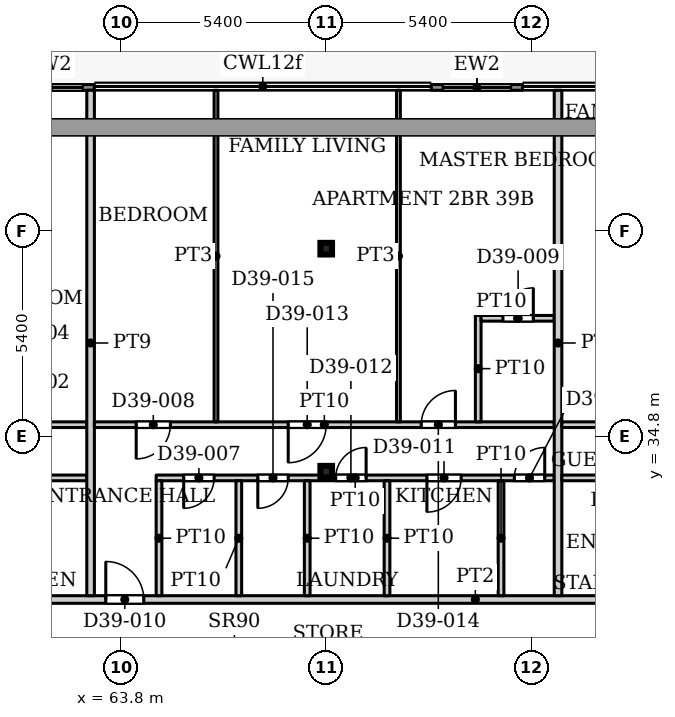
"""IFC4 building model, lengths in metres.
Left out: names, types, materials, properties, quantities, classifications, styles, units other than length and angle.
Written with IfcOpenShell. Run it as: python <this file> out.ifc"""

import sys

from ifc_helpers import new_model, si_unit, direction, frame, frame_2d, origin, origin_2d, place, context, subcontext, project, spatial, rectangle, hollow_rectangle, extrude, source, transform, mapped, element, fill, save


model = new_model("IFC4")
c1 = context("Model", 3, precision=1e-05, world=origin(), true_north=direction((0.0, 1.0)))
c2 = subcontext(c1, "Body", "Model", "MODEL_VIEW")
j1 = project(units=[si_unit("LENGTHUNIT", "METRE"), si_unit("PLANEANGLEUNIT", "RADIAN")], contexts=[c1])
p1 = place(None, origin())
s1 = spatial("IfcSite", under=j1, at=p1, CompositionType="ELEMENT")
p2 = place(p1, origin())
s2 = spatial("IfcBuilding", under=s1, at=p2, CompositionType="ELEMENT")
p3 = place(p2, frame((0.0, 0.0, 168.2)))
s3 = spatial("IfcBuildingStorey", under=s2, at=p3, CompositionType="ELEMENT", Elevation=168.2)
for number, where, z_axis, x_axis in (
    (1, (69.2, 33.863, 0.0), (0.0, 0.0, 1.0), (1.0, 0.0, 0.0)),
    (2, (69.2, 39.732, 0.0), (0.0, 0.0, 1.0), (1.0, 0.0, 0.0)),
):
    element("IfcColumn", number, at=place(p3, frame(where, z_axis=z_axis, x_axis=x_axis)), inside=s3, PredefinedType="COLUMN", context=c2, shape_type="SweptSolid", body=[
        extrude(hollow_rectangle(XDim=0.305, YDim=0.305, WallThickness=0.016, InnerFilletRadius=0.016, OuterFilletRadius=0.032, at=origin_2d()), origin(), (0.0, 0.0, 1.0), 3.9),
    ])
p4 = place(p3, frame((60.697, 43.975, 0.0), z_axis=(0.0, 0.0, 1.0), x_axis=(1.0, 0.0, 0.0)))
e3 = element("IfcWall", 3, at=p4, inside=s3, PredefinedType="SOLIDWALL", context=c2, shape_type="SweptSolid", body=[
    extrude(rectangle(XDim=2.4, YDim=0.15, at=frame_2d((1.2, 0.0))), origin(), (0.0, 0.0, 1.0), 3.75),
])
p5 = place(p4, frame((0.3, 0.0, 0.0)))
e4 = element("IfcOpeningElement", 4, at=p5, cuts=e3, PredefinedType="OPENING", context=c2, shape_type="SweptSolid", body=[
    extrude(rectangle(XDim=1.8, YDim=2.4, at=frame_2d((0.9, 1.2))), frame((0.0, 0.085, 0.0), z_axis=(0.0, -1.0, 0.0), x_axis=(1.0, 0.0, 0.0)), (0.0, 0.0, 1.0), 0.17),
])
p6 = place(p3, frame((71.965, 43.975, 0.0), z_axis=(0.0, 0.0, 1.0), x_axis=(1.0, 0.0, 0.0)))
e5 = element("IfcWall", 5, at=p6, inside=s3, PredefinedType="SOLIDWALL", context=c2, shape_type="SweptSolid", body=[
    extrude(rectangle(XDim=2.4, YDim=0.15, at=frame_2d((1.2, 0.0))), origin(), (0.0, 0.0, 1.0), 3.75),
])
p7 = place(p6, frame((0.3, 0.0, 0.0)))
e6 = element("IfcOpeningElement", 6, at=p7, cuts=e5, PredefinedType="OPENING", context=c2, shape_type="SweptSolid", body=[
    extrude(rectangle(XDim=1.8, YDim=2.4, at=frame_2d((0.9, 1.2))), frame((0.0, 0.085, 0.0), z_axis=(0.0, -1.0, 0.0), x_axis=(1.0, 0.0, 0.0)), (0.0, 0.0, 1.0), 0.17),
])
p8 = place(p3, frame((53.549, 30.5, 0.0), z_axis=(0.0, 0.0, 1.0), x_axis=(1.0, 0.0, 0.0)))
e7 = element("IfcWall", 7, at=p8, inside=s3, PredefinedType="PARTITIONING", context=c2, shape_type="SweptSolid", body=[
    extrude(rectangle(XDim=39.151, YDim=0.2, at=frame_2d((19.575, 0.0))), origin(), (0.0, 0.0, 1.0), 3.6),
])
p9 = place(p8, frame((2.801, 0.0, 0.0)))
e8 = element("IfcOpeningElement", 8, at=p9, cuts=e7, PredefinedType="OPENING", context=c2, shape_type="SweptSolid", body=[
    extrude(rectangle(XDim=1.0, YDim=2.1, at=frame_2d((0.5, 1.05))), frame((0.0, 0.11, 0.0), z_axis=(0.0, -1.0, 0.0), x_axis=(1.0, 0.0, 0.0)), (0.0, 0.0, 1.0), 0.22),
])
p10 = place(p8, frame((9.851, 0.0, 0.0)))
e9 = element("IfcOpeningElement", 9, at=p10, cuts=e7, PredefinedType="OPENING", context=c2, shape_type="SweptSolid", body=[
    extrude(rectangle(XDim=1.0, YDim=2.1, at=frame_2d((0.5, 1.05))), frame((0.0, 0.11, 0.0), z_axis=(0.0, -1.0, 0.0), x_axis=(1.0, 0.0, 0.0)), (0.0, 0.0, 1.0), 0.22),
])
p11 = place(p8, frame((28.751, 0.0, 0.0)))
e10 = element("IfcOpeningElement", 10, at=p11, cuts=e7, PredefinedType="OPENING", context=c2, shape_type="SweptSolid", body=[
    extrude(rectangle(XDim=1.0, YDim=2.1, at=frame_2d((0.5, 1.05))), frame((0.0, 0.11, 0.0), z_axis=(0.0, -1.0, 0.0), x_axis=(1.0, 0.0, 0.0)), (0.0, 0.0, 1.0), 0.22),
])
p12 = place(p8, frame((32.651, 0.0, 0.0)))
e11 = element("IfcOpeningElement", 11, at=p12, cuts=e7, PredefinedType="OPENING", context=c2, shape_type="SweptSolid", body=[
    extrude(rectangle(XDim=1.0, YDim=2.1, at=frame_2d((0.5, 1.05))), frame((0.0, 0.11, 0.0), z_axis=(0.0, -1.0, 0.0), x_axis=(1.0, 0.0, 0.0)), (0.0, 0.0, 1.0), 0.22),
])
p13 = place(p3, frame((53.549, 35.1, 0.0), z_axis=(0.0, 0.0, 1.0), x_axis=(1.0, 0.0, 0.0)))
e12 = element("IfcWall", 12, at=p13, inside=s3, PredefinedType="PARTITIONING", context=c2, shape_type="SweptSolid", body=[
    extrude(rectangle(XDim=9.351, YDim=0.15, at=frame_2d((4.675, 0.0))), origin(), (0.0, 0.0, 1.0), 3.6),
])
p14 = place(p13, frame((7.351, 0.0, 0.0)))
e13 = element("IfcOpeningElement", 13, at=p14, cuts=e12, PredefinedType="OPENING", context=c2, shape_type="SweptSolid", body=[
    extrude(rectangle(XDim=0.9, YDim=2.1, at=frame_2d((0.45, 1.05))), frame((0.0, 0.085, 0.0), z_axis=(0.0, -1.0, 0.0), x_axis=(1.0, 0.0, 0.0)), (0.0, 0.0, 1.0), 0.17),
])
p15 = place(p13, frame((2.501, 0.0, 0.0)))
e14 = element("IfcOpeningElement", 14, at=p15, cuts=e12, PredefinedType="OPENING", context=c2, shape_type="SweptSolid", body=[
    extrude(rectangle(XDim=1.0, YDim=2.1, at=frame_2d((0.5, 1.05))), frame((0.0, 0.085, 0.0), z_axis=(0.0, -1.0, 0.0), x_axis=(1.0, 0.0, 0.0)), (0.0, 0.0, 1.0), 0.17),
])
p16 = place(p3, frame((57.825, 33.7, 0.0), z_axis=(0.0, 0.0, 1.0), x_axis=(1.0, 0.0, 0.0)))
e15 = element("IfcWall", 15, at=p16, inside=s3, PredefinedType="PARTITIONING", context=c2, shape_type="SweptSolid", body=[
    extrude(rectangle(XDim=5.075, YDim=0.15, at=frame_2d((2.538, 0.0))), origin(), (0.0, 0.0, 1.0), 3.6),
])
p17 = place(p16, frame((3.075, 0.0, 0.0)))
e16 = element("IfcOpeningElement", 16, at=p17, cuts=e15, PredefinedType="OPENING", context=c2, shape_type="SweptSolid", body=[
    extrude(rectangle(XDim=0.9, YDim=2.1, at=frame_2d((0.45, 1.05))), frame((0.0, 0.085, 0.0), z_axis=(0.0, -1.0, 0.0), x_axis=(1.0, 0.0, 0.0)), (0.0, 0.0, 1.0), 0.17),
])
p18 = place(p16, frame((0.575, 0.0, 0.0)))
e17 = element("IfcOpeningElement", 17, at=p18, cuts=e15, PredefinedType="OPENING", context=c2, shape_type="SweptSolid", body=[
    extrude(rectangle(XDim=0.8, YDim=2.1, at=frame_2d((0.4, 1.05))), frame((0.0, 0.085, 0.0), z_axis=(0.0, -1.0, 0.0), x_axis=(1.0, 0.0, 0.0)), (0.0, 0.0, 1.0), 0.17),
])
p19 = place(p3, frame((63.0, 30.6, 0.0), z_axis=(0.0, 0.0, 1.0), x_axis=(0.0, 1.0, 0.0)))
e18 = element("IfcWall", 18, at=p19, inside=s3, PredefinedType="PARTITIONING", context=c2, shape_type="SweptSolid", body=[
    extrude(rectangle(XDim=13.3, YDim=0.2, at=frame_2d((6.65, 0.0))), origin(), (0.0, 0.0, 1.0), 3.6),
])
p20 = place(p3, frame((63.1, 35.1, 0.0), z_axis=(0.0, 0.0, 1.0), x_axis=(1.0, 0.0, 0.0)))
e19 = element("IfcWall", 19, at=p20, inside=s3, PredefinedType="PARTITIONING", context=c2, shape_type="SweptSolid", body=[
    extrude(rectangle(XDim=12.1, YDim=0.15, at=frame_2d((6.05, 0.0))), origin(), (0.0, 0.0, 1.0), 3.6),
])
p21 = place(p20, frame((1.1, 0.0, 0.0)))
e20 = element("IfcOpeningElement", 20, at=p21, cuts=e19, PredefinedType="OPENING", context=c2, shape_type="SweptSolid", body=[
    extrude(rectangle(XDim=0.9, YDim=2.1, at=frame_2d((0.45, 1.05))), frame((0.0, 0.085, 0.0), z_axis=(0.0, -1.0, 0.0), x_axis=(1.0, 0.0, 0.0)), (0.0, 0.0, 1.0), 0.17),
])
p22 = place(p20, frame((5.1, 0.0, 0.0)))
e21 = element("IfcOpeningElement", 21, at=p22, cuts=e19, PredefinedType="OPENING", context=c2, shape_type="SweptSolid", body=[
    extrude(rectangle(XDim=1.0, YDim=2.1, at=frame_2d((0.5, 1.05))), frame((0.0, 0.085, 0.0), z_axis=(0.0, -1.0, 0.0), x_axis=(1.0, 0.0, 0.0)), (0.0, 0.0, 1.0), 0.17),
])
p23 = place(p20, frame((8.6, 0.0, 0.0)))
e22 = element("IfcOpeningElement", 22, at=p23, cuts=e19, PredefinedType="OPENING", context=c2, shape_type="SweptSolid", body=[
    extrude(rectangle(XDim=0.9, YDim=2.1, at=frame_2d((0.45, 1.05))), frame((0.0, 0.085, 0.0), z_axis=(0.0, -1.0, 0.0), x_axis=(1.0, 0.0, 0.0)), (0.0, 0.0, 1.0), 0.17),
])
p24 = place(p3, frame((64.725, 33.7, 0.0), z_axis=(0.0, 0.0, 1.0), x_axis=(1.0, 0.0, 0.0)))
e23 = element("IfcWall", 23, at=p24, inside=s3, PredefinedType="PARTITIONING", context=c2, shape_type="SweptSolid", body=[
    extrude(rectangle(XDim=10.475, YDim=0.15, at=frame_2d((5.237, 0.0))), origin(), (0.0, 0.0, 1.0), 3.6),
])
p25 = place(p24, frame((0.725, 0.0, 0.0)))
e24 = element("IfcOpeningElement", 24, at=p25, cuts=e23, PredefinedType="OPENING", context=c2, shape_type="SweptSolid", body=[
    extrude(rectangle(XDim=0.8, YDim=2.1, at=frame_2d((0.4, 1.05))), frame((0.0, 0.085, 0.0), z_axis=(0.0, -1.0, 0.0), x_axis=(1.0, 0.0, 0.0)), (0.0, 0.0, 1.0), 0.17),
])
p26 = place(p24, frame((7.125, 0.0, 0.0)))
e25 = element("IfcOpeningElement", 25, at=p26, cuts=e23, PredefinedType="OPENING", context=c2, shape_type="SweptSolid", body=[
    extrude(rectangle(XDim=0.9, YDim=2.1, at=frame_2d((0.45, 1.05))), frame((0.0, 0.085, 0.0), z_axis=(0.0, -1.0, 0.0), x_axis=(1.0, 0.0, 0.0)), (0.0, 0.0, 1.0), 0.17),
])
p27 = place(p24, frame((4.725, 0.0, 0.0)))
e26 = element("IfcOpeningElement", 26, at=p27, cuts=e23, PredefinedType="OPENING", context=c2, shape_type="SweptSolid", body=[
    extrude(rectangle(XDim=0.8, YDim=2.1, at=frame_2d((0.4, 1.05))), frame((0.0, 0.085, 0.0), z_axis=(0.0, -1.0, 0.0), x_axis=(1.0, 0.0, 0.0)), (0.0, 0.0, 1.0), 0.17),
])
p28 = place(p24, frame((2.675, 0.0, 0.0)))
e27 = element("IfcOpeningElement", 27, at=p28, cuts=e23, PredefinedType="OPENING", context=c2, shape_type="SweptSolid", body=[
    extrude(rectangle(XDim=0.8, YDim=2.1, at=frame_2d((0.4, 1.05))), frame((0.0, 0.085, 0.0), z_axis=(0.0, -1.0, 0.0), x_axis=(1.0, 0.0, 0.0)), (0.0, 0.0, 1.0), 0.17),
])
p29 = place(p24, frame((9.425, 0.0, 0.0)))
e28 = element("IfcOpeningElement", 28, at=p29, cuts=e23, PredefinedType="OPENING", context=c2, shape_type="SweptSolid", body=[
    extrude(rectangle(XDim=0.8, YDim=2.1, at=frame_2d((0.4, 1.05))), frame((0.0, 0.085, 0.0), z_axis=(0.0, -1.0, 0.0), x_axis=(1.0, 0.0, 0.0)), (0.0, 0.0, 1.0), 0.17),
])
p30 = place(p3, frame((64.8, 30.6, 0.0), z_axis=(0.0, 0.0, 1.0), x_axis=(0.0, 1.0, 0.0)))
e29 = element("IfcWall", 29, at=p30, inside=s3, PredefinedType="PARTITIONING", context=c2, shape_type="SweptSolid", body=[
    extrude(rectangle(XDim=3.025, YDim=0.15, at=frame_2d((1.512, 0.0))), origin(), (0.0, 0.0, 1.0), 3.6),
])
p31 = place(p3, frame((66.3, 35.175, 0.0), z_axis=(0.0, 0.0, 1.0), x_axis=(0.0, 1.0, 0.0)))
e30 = element("IfcWall", 30, at=p31, inside=s3, PredefinedType="PARTITIONING", context=c2, shape_type="SweptSolid", body=[
    extrude(rectangle(XDim=8.725, YDim=0.1, at=frame_2d((4.362, 0.0))), origin(), (0.0, 0.0, 1.0), 3.6),
])
for number, where, z_axis, x_axis in (
    (31, (66.9, 30.6, 0.0), (0.0, 0.0, 1.0), (0.0, 1.0, 0.0)),
    (32, (68.7, 30.6, 0.0), (0.0, 0.0, 1.0), (0.0, 1.0, 0.0)),
    (33, (70.8, 30.6, 0.0), (0.0, 0.0, 1.0), (0.0, 1.0, 0.0)),
):
    element("IfcWall", number, at=place(p3, frame(where, z_axis=z_axis, x_axis=x_axis)), inside=s3, PredefinedType="PARTITIONING", context=c2, shape_type="SweptSolid", body=[
        extrude(rectangle(XDim=3.025, YDim=0.15, at=frame_2d((1.512, 0.0))), origin(), (0.0, 0.0, 1.0), 3.6),
    ])
p32 = place(p3, frame((71.1, 35.175, 0.0), z_axis=(0.0, 0.0, 1.0), x_axis=(0.0, 1.0, 0.0)))
e34 = element("IfcWall", 34, at=p32, inside=s3, PredefinedType="PARTITIONING", context=c2, shape_type="SweptSolid", body=[
    extrude(rectangle(XDim=8.725, YDim=0.1, at=frame_2d((4.362, 0.0))), origin(), (0.0, 0.0, 1.0), 3.6),
])
p33 = place(p3, frame((73.2, 35.175, 0.0), z_axis=(0.0, 0.0, 1.0), x_axis=(0.0, 1.0, 0.0)))
e35 = element("IfcWall", 35, at=p33, inside=s3, PredefinedType="PARTITIONING", context=c2, shape_type="SweptSolid", body=[
    extrude(rectangle(XDim=2.8, YDim=0.15, at=frame_2d((1.4, 0.0))), origin(), (0.0, 0.0, 1.0), 3.6),
])
p34 = place(p3, frame((73.275, 37.9, 0.0), z_axis=(0.0, 0.0, 1.0), x_axis=(1.0, 0.0, 0.0)))
e36 = element("IfcWall", 36, at=p34, inside=s3, PredefinedType="PARTITIONING", context=c2, shape_type="SweptSolid", body=[
    extrude(rectangle(XDim=1.925, YDim=0.15, at=frame_2d((0.962, 0.0))), origin(), (0.0, 0.0, 1.0), 3.6),
])
p35 = place(p34, frame((0.575, 0.0, 0.0)))
e37 = element("IfcOpeningElement", 37, at=p35, cuts=e36, PredefinedType="OPENING", context=c2, shape_type="SweptSolid", body=[
    extrude(rectangle(XDim=0.8, YDim=2.1, at=frame_2d((0.4, 1.05))), frame((0.0, 0.085, 0.0), z_axis=(0.0, -1.0, 0.0), x_axis=(1.0, 0.0, 0.0)), (0.0, 0.0, 1.0), 0.17),
])
p36 = place(p3, frame((73.8, 30.6, 0.0), z_axis=(0.0, 0.0, 1.0), x_axis=(0.0, 1.0, 0.0)))
e38 = element("IfcWall", 38, at=p36, inside=s3, PredefinedType="PARTITIONING", context=c2, shape_type="SweptSolid", body=[
    extrude(rectangle(XDim=3.025, YDim=0.15, at=frame_2d((1.512, 0.0))), origin(), (0.0, 0.0, 1.0), 3.6),
])
p37 = place(p3, frame((75.3, 30.6, 0.0), z_axis=(0.0, 0.0, 1.0), x_axis=(0.0, 1.0, 0.0)))
e39 = element("IfcWall", 39, at=p37, inside=s3, PredefinedType="PARTITIONING", context=c2, shape_type="SweptSolid", body=[
    extrude(rectangle(XDim=13.3, YDim=0.2, at=frame_2d((6.65, 0.0))), origin(), (0.0, 0.0, 1.0), 3.6),
])
p38 = place(p3, frame((75.4, 33.7, 0.0), z_axis=(0.0, 0.0, 1.0), x_axis=(1.0, 0.0, 0.0)))
e40 = element("IfcWall", 40, at=p38, inside=s3, PredefinedType="PARTITIONING", context=c2, shape_type="SweptSolid", body=[
    extrude(rectangle(XDim=6.275, YDim=0.15, at=frame_2d((3.138, 0.0))), origin(), (0.0, 0.0, 1.0), 3.6),
])
p39 = place(p38, frame((4.6, 0.0, 0.0)))
e41 = element("IfcOpeningElement", 41, at=p39, cuts=e40, PredefinedType="OPENING", context=c2, shape_type="SweptSolid", body=[
    extrude(rectangle(XDim=0.8, YDim=2.1, at=frame_2d((0.4, 1.05))), frame((0.0, 0.085, 0.0), z_axis=(0.0, -1.0, 0.0), x_axis=(1.0, 0.0, 0.0)), (0.0, 0.0, 1.0), 0.17),
])
p40 = place(p38, frame((1.4, 0.0, 0.0)))
e42 = element("IfcOpeningElement", 42, at=p40, cuts=e40, PredefinedType="OPENING", context=c2, shape_type="SweptSolid", body=[
    extrude(rectangle(XDim=0.9, YDim=2.1, at=frame_2d((0.45, 1.05))), frame((0.0, 0.085, 0.0), z_axis=(0.0, -1.0, 0.0), x_axis=(1.0, 0.0, 0.0)), (0.0, 0.0, 1.0), 0.17),
])
p41 = place(p3, frame((75.4, 35.1, 0.0), z_axis=(0.0, 0.0, 1.0), x_axis=(1.0, 0.0, 0.0)))
e43 = element("IfcWall", 43, at=p41, inside=s3, PredefinedType="PARTITIONING", context=c2, shape_type="SweptSolid", body=[
    extrude(rectangle(XDim=10.3, YDim=0.15, at=frame_2d((5.15, 0.0))), origin(), (0.0, 0.0, 1.0), 3.6),
])
p42 = place(p41, frame((5.3, 0.0, 0.0)))
e44 = element("IfcOpeningElement", 44, at=p42, cuts=e43, PredefinedType="OPENING", context=c2, shape_type="SweptSolid", body=[
    extrude(rectangle(XDim=0.9, YDim=2.1, at=frame_2d((0.45, 1.05))), frame((0.0, 0.085, 0.0), z_axis=(0.0, -1.0, 0.0), x_axis=(1.0, 0.0, 0.0)), (0.0, 0.0, 1.0), 0.17),
])
p43 = place(p41, frame((1.65, 0.0, 0.0)))
e45 = element("IfcOpeningElement", 45, at=p43, cuts=e43, PredefinedType="OPENING", context=c2, shape_type="SweptSolid", body=[
    extrude(rectangle(XDim=1.0, YDim=2.1, at=frame_2d((0.5, 1.05))), frame((0.0, 0.085, 0.0), z_axis=(0.0, -1.0, 0.0), x_axis=(1.0, 0.0, 0.0)), (0.0, 0.0, 1.0), 0.17),
])
p44 = place(p41, frame((8.3, 0.0, 0.0)))
e46 = element("IfcOpeningElement", 46, at=p44, cuts=e43, PredefinedType="OPENING", context=c2, shape_type="SweptSolid", body=[
    extrude(rectangle(XDim=0.9, YDim=2.1, at=frame_2d((0.45, 1.05))), frame((0.0, 0.085, 0.0), z_axis=(0.0, -1.0, 0.0), x_axis=(1.0, 0.0, 0.0)), (0.0, 0.0, 1.0), 0.17),
])
m1 = source(origin(), c2, "Body", "SweptSolid", [
    extrude(rectangle(XDim=1.8, YDim=2.4, at=frame_2d((0.9, 1.2))), frame((0.0, 0.025, 0.0), z_axis=(0.0, -1.0, 0.0), x_axis=(1.0, 0.0, 0.0)), (0.0, 0.0, 1.0), 0.05),
])
p45 = place(p5, origin())
e47 = element("IfcDoor", 47, at=p45, inside=s3, OperationType="SLIDING_TO_LEFT", PredefinedType="DOOR", context=c2, shape_type="MappedRepresentation", body=[
    mapped(m1, transform((0.0, 0.0, 0.0), x_axis=(1.0, 0.0, 0.0), y_axis=(0.0, 1.0, 0.0), z_axis=(0.0, 0.0, 1.0), scale=1.0)),
])
fill(e4, e47)
p46 = place(p7, origin())
e48 = element("IfcDoor", 48, at=p46, inside=s3, OperationType="SLIDING_TO_LEFT", PredefinedType="DOOR", context=c2, shape_type="MappedRepresentation", body=[
    mapped(m1, transform((0.0, 0.0, 0.0), x_axis=(1.0, 0.0, 0.0), y_axis=(0.0, 1.0, 0.0), z_axis=(0.0, 0.0, 1.0), scale=1.0)),
])
fill(e6, e48)
m2 = source(origin(), c2, "Body", "SweptSolid", [
    extrude(rectangle(XDim=0.8, YDim=2.1, at=frame_2d((0.4, 1.05))), frame((0.0, 0.025, 0.0), z_axis=(0.0, -1.0, 0.0), x_axis=(1.0, 0.0, 0.0)), (0.0, 0.0, 1.0), 0.05),
])
p47 = place(p25, origin())
e49 = element("IfcDoor", 49, at=p47, inside=s3, OperationType="SINGLE_SWING_RIGHT", PredefinedType="DOOR", context=c2, shape_type="MappedRepresentation", body=[
    mapped(m2, transform((0.0, 0.0, 0.0), x_axis=(1.0, 0.0, 0.0), y_axis=(0.0, 1.0, 0.0), z_axis=(0.0, 0.0, 1.0), scale=1.0)),
])
fill(e24, e49)
m3 = source(origin(), c2, "Body", "SweptSolid", [
    extrude(rectangle(XDim=0.9, YDim=2.1, at=frame_2d((0.45, 1.05))), frame((0.0, 0.025, 0.0), z_axis=(0.0, -1.0, 0.0), x_axis=(1.0, 0.0, 0.0)), (0.0, 0.0, 1.0), 0.05),
])
p48 = place(p21, origin())
e50 = element("IfcDoor", 50, at=p48, inside=s3, OperationType="SINGLE_SWING_RIGHT", PredefinedType="DOOR", context=c2, shape_type="MappedRepresentation", body=[
    mapped(m3, transform((0.0, 0.0, 0.0), x_axis=(1.0, 0.0, 0.0), y_axis=(0.0, 1.0, 0.0), z_axis=(0.0, 0.0, 1.0), scale=1.0)),
])
fill(e20, e50)
p49 = place(p35, origin())
e51 = element("IfcDoor", 51, at=p49, inside=s3, OperationType="SINGLE_SWING_LEFT", PredefinedType="DOOR", context=c2, shape_type="MappedRepresentation", body=[
    mapped(m2, transform((0.0, 0.0, 0.0), x_axis=(1.0, 0.0, 0.0), y_axis=(0.0, 1.0, 0.0), z_axis=(0.0, 0.0, 1.0), scale=1.0)),
])
fill(e37, e51)
m4 = source(origin(), c2, "Body", "SweptSolid", [
    extrude(rectangle(XDim=1.0, YDim=2.1, at=frame_2d((0.5, 1.05))), frame((0.0, 0.025, 0.0), z_axis=(0.0, -1.0, 0.0), x_axis=(1.0, 0.0, 0.0)), (0.0, 0.0, 1.0), 0.05),
])
p50 = place(p10, origin())
e52 = element("IfcDoor", 52, at=p50, inside=s3, OperationType="SINGLE_SWING_LEFT", PredefinedType="DOOR", context=c2, shape_type="MappedRepresentation", body=[
    mapped(m4, transform((0.0, 0.0, 0.0), x_axis=(1.0, 0.0, 0.0), y_axis=(0.0, 1.0, 0.0), z_axis=(0.0, 0.0, 1.0), scale=1.0)),
])
fill(e9, e52)
p51 = place(p26, origin())
e53 = element("IfcDoor", 53, at=p51, inside=s3, OperationType="SINGLE_SWING_RIGHT", PredefinedType="DOOR", context=c2, shape_type="MappedRepresentation", body=[
    mapped(m3, transform((0.0, 0.0, 0.0), x_axis=(1.0, 0.0, 0.0), y_axis=(0.0, 1.0, 0.0), z_axis=(0.0, 0.0, 1.0), scale=1.0)),
])
fill(e25, e53)
p52 = place(p27, origin())
e54 = element("IfcDoor", 54, at=p52, inside=s3, OperationType="SINGLE_SWING_LEFT", PredefinedType="DOOR", context=c2, shape_type="MappedRepresentation", body=[
    mapped(m2, transform((0.0, 0.0, 0.0), x_axis=(1.0, 0.0, 0.0), y_axis=(0.0, 1.0, 0.0), z_axis=(0.0, 0.0, 1.0), scale=1.0)),
])
fill(e26, e54)
m5 = source(origin(), c2, "Body", "SweptSolid", [
    extrude(rectangle(XDim=1.0, YDim=2.1, at=frame_2d((0.5, 1.05))), frame((0.0, 0.025, 0.0), z_axis=(0.0, -1.0, 0.0), x_axis=(1.0, 0.0, 0.0)), (0.0, 0.0, 1.0), 0.05),
])
p53 = place(p22, origin())
e55 = element("IfcDoor", 55, at=p53, inside=s3, OperationType="SINGLE_SWING_RIGHT", PredefinedType="DOOR", context=c2, shape_type="MappedRepresentation", body=[
    mapped(m5, transform((0.0, 0.0, 0.0), x_axis=(1.0, 0.0, 0.0), y_axis=(0.0, 1.0, 0.0), z_axis=(0.0, 0.0, 1.0), scale=1.0)),
])
fill(e21, e55)
p54 = place(p23, origin())
e56 = element("IfcDoor", 56, at=p54, inside=s3, OperationType="SINGLE_SWING_LEFT", PredefinedType="DOOR", context=c2, shape_type="MappedRepresentation", body=[
    mapped(m3, transform((0.0, 0.0, 0.0), x_axis=(1.0, 0.0, 0.0), y_axis=(0.0, 1.0, 0.0), z_axis=(0.0, 0.0, 1.0), scale=1.0)),
])
fill(e22, e56)
p55 = place(p28, origin())
e57 = element("IfcDoor", 57, at=p55, inside=s3, OperationType="SINGLE_SWING_RIGHT", PredefinedType="DOOR", context=c2, shape_type="MappedRepresentation", body=[
    mapped(m2, transform((0.0, 0.0, 0.0), x_axis=(1.0, 0.0, 0.0), y_axis=(0.0, 1.0, 0.0), z_axis=(0.0, 0.0, 1.0), scale=1.0)),
])
fill(e27, e57)
p56 = place(p29, origin())
e58 = element("IfcDoor", 58, at=p56, inside=s3, OperationType="SINGLE_SWING_LEFT", PredefinedType="DOOR", context=c2, shape_type="MappedRepresentation", body=[
    mapped(m2, transform((0.0, 0.0, 0.0), x_axis=(1.0, 0.0, 0.0), y_axis=(0.0, 1.0, 0.0), z_axis=(0.0, 0.0, 1.0), scale=1.0)),
])
fill(e28, e58)
save(model, sys.argv[1])
